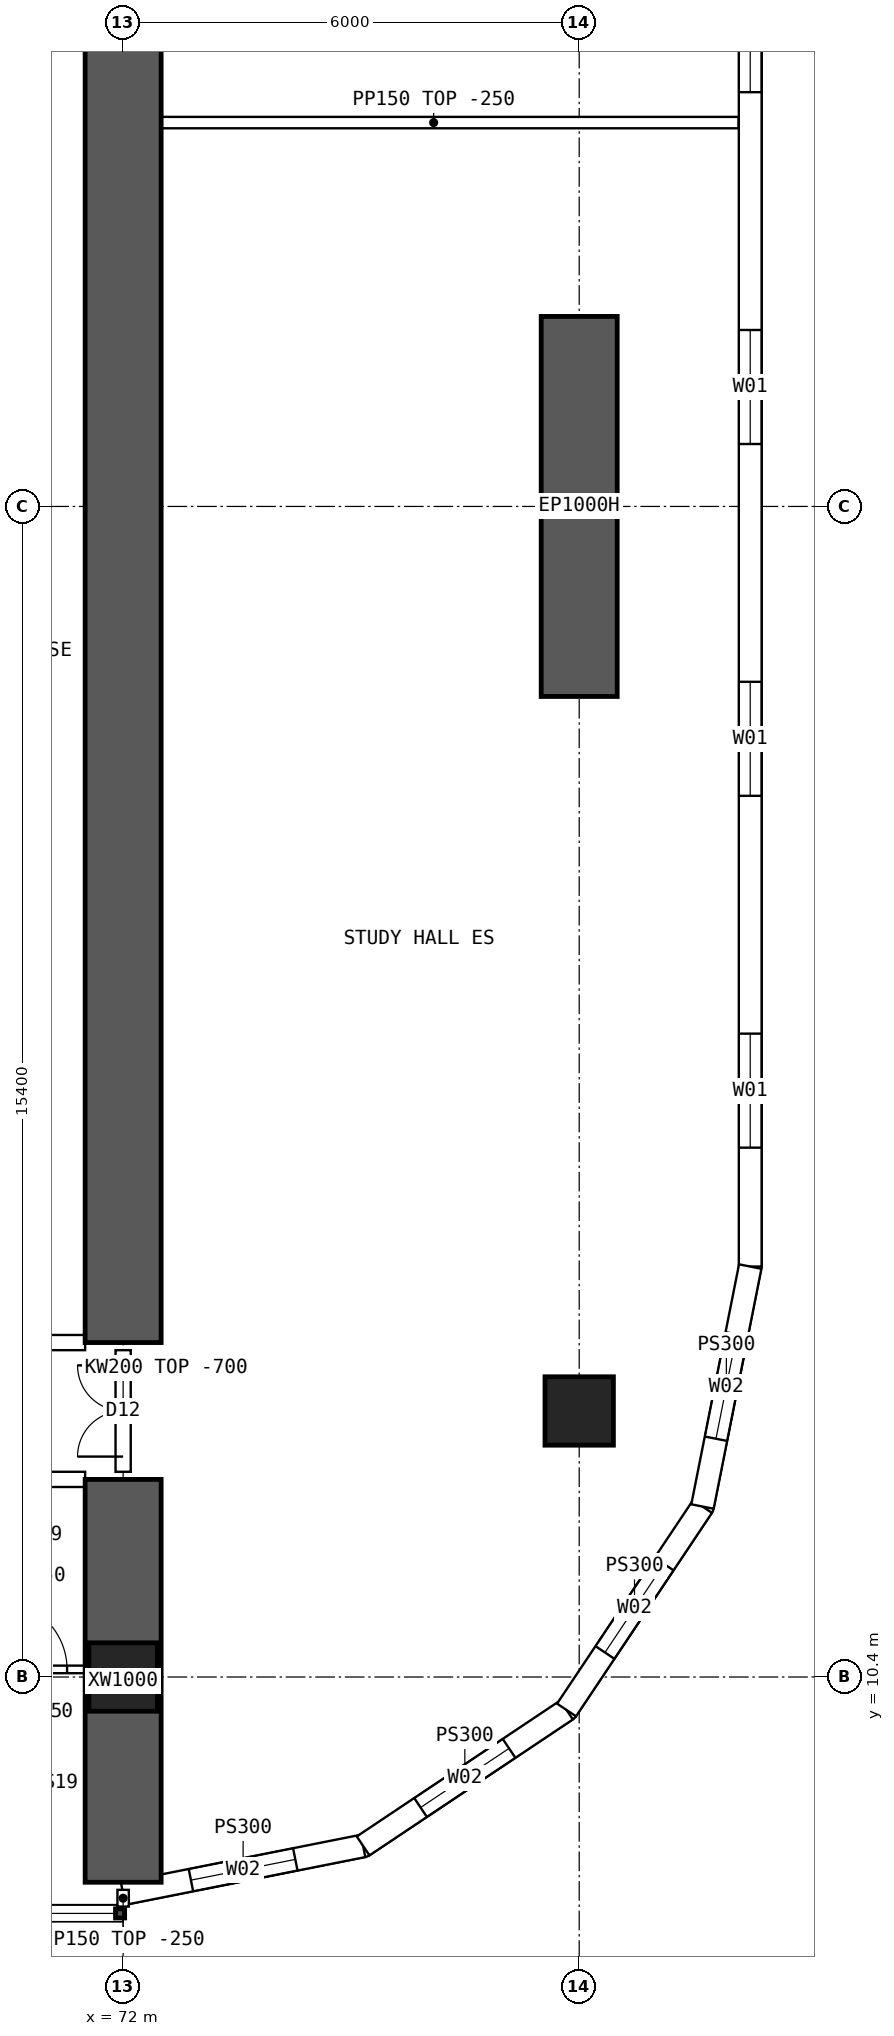
"""IFC4 building model, lengths in metres.
Left out: names, types, materials, properties, quantities, classifications, styles, units other than length and angle.
Written with IfcOpenShell. Run it as: python <this file> out.ifc"""

import sys

from ifc_helpers import new_model, si_unit, direction, frame, frame_2d, origin, origin_2d, place, context, subcontext, project, spatial, polyline, rectangle, hollow_rectangle, outline, extrude, element, fill, save


model = new_model("IFC4")
c1 = context("Model", 3, precision=1e-05, world=origin(), true_north=direction((0.0, 1.0)))
c2 = subcontext(c1, "Body", "Model", "MODEL_VIEW")
j1 = project(units=[si_unit("LENGTHUNIT", "METRE"), si_unit("PLANEANGLEUNIT", "RADIAN")], contexts=[c1])
p1 = place(None, origin())
s1 = spatial("IfcSite", under=j1, at=p1, CompositionType="ELEMENT")
p2 = place(p1, origin())
s2 = spatial("IfcBuilding", under=s1, at=p2, CompositionType="ELEMENT")
p3 = place(p2, frame((0.0, 0.0, 23.95)))
s3 = spatial("IfcBuildingStorey", under=s2, at=p3, CompositionType="ELEMENT", Elevation=23.95)
for number, where, z_axis, x_axis in (
    (1, (72.0, 10.4, 0.0), (0.0, 0.0, 1.0), (1.0, 0.0, 0.0)),
    (2, (78.0, 13.9, 0.0), (0.0, 0.0, 1.0), (1.0, 0.0, 0.0)),
):
    element("IfcColumn", number, at=place(p3, frame(where, z_axis=z_axis, x_axis=x_axis)), inside=s3, PredefinedType="COLUMN", context=c2, shape_type="SweptSolid", body=[
        extrude(hollow_rectangle(XDim=0.9, YDim=0.9, WallThickness=0.09, at=origin_2d()), origin(), (0.0, 0.0, 1.0), 3.75),
    ])
p4 = place(p3, frame((78.0, 23.3, 0.0), z_axis=(0.0, 0.0, 1.0), x_axis=(0.0, 1.0, 0.0)))
e3 = element("IfcWall", 3, at=p4, inside=s3, PredefinedType="SHEAR", context=c2, shape_type="SweptSolid", body=[
    extrude(rectangle(XDim=5.0, YDim=1.0, at=frame_2d((2.5, 0.0))), origin(), (0.0, 0.0, 1.0), 3.75),
])
p5 = place(p3, frame((72.0, 7.7, 0.0), z_axis=(0.0, 0.0, 1.0), x_axis=(0.0, 1.0, 0.0)))
e4 = element("IfcWall", 4, at=p5, inside=s3, PredefinedType="SHEAR", context=c2, shape_type="SweptSolid", body=[
    extrude(rectangle(XDim=5.3, YDim=1.0, at=frame_2d((2.65, 0.0))), origin(), (0.0, 0.0, 1.0), 3.75),
])
p6 = place(p3, frame((72.0, 14.8, 0.0), z_axis=(0.0, 0.0, 1.0), x_axis=(0.0, 1.0, 0.0)))
e5 = element("IfcWall", 5, at=p6, inside=s3, PredefinedType="SHEAR", context=c2, shape_type="SweptSolid", body=[
    extrude(rectangle(XDim=34.4, YDim=1.0, at=frame_2d((17.2, 0.0))), origin(), (0.0, 0.0, 1.0), 3.75),
])
p7 = place(p3, frame((80.25, 15.8, 0.0), z_axis=(0.0, 0.0, 1.0), x_axis=(0.0, 1.0, 0.0)))
e6 = element("IfcWall", 6, at=p7, inside=s3, PredefinedType="SOLIDWALL", context=c2, shape_type="SweptSolid", body=[
    extrude(outline(polyline([(-0.015, -0.15), (32.415, -0.15), (32.385, 0.15), (0.015, 0.15), (-0.015, -0.15)])), origin(), (0.0, 0.0, 1.0), 3.5),
])
p8 = place(p7, frame((1.564, 0.0, 0.9)))
e7 = element("IfcOpeningElement", 7, at=p8, cuts=e6, PredefinedType="OPENING", context=c2, shape_type="SweptSolid", body=[
    extrude(rectangle(XDim=1.5, YDim=2.0, at=frame_2d((0.75, 1.0))), frame((0.0, 0.16, 0.0), z_axis=(0.0, -1.0, 0.0), x_axis=(1.0, 0.0, 0.0)), (0.0, 0.0, 1.0), 0.32),
])
p9 = place(p7, frame((6.193, 0.0, 0.9)))
e8 = element("IfcOpeningElement", 8, at=p9, cuts=e6, PredefinedType="OPENING", context=c2, shape_type="SweptSolid", body=[
    extrude(rectangle(XDim=1.5, YDim=2.0, at=frame_2d((0.75, 1.0))), frame((0.0, 0.16, 0.0), z_axis=(0.0, -1.0, 0.0), x_axis=(1.0, 0.0, 0.0)), (0.0, 0.0, 1.0), 0.32),
])
p10 = place(p7, frame((10.822, 0.0, 0.9)))
e9 = element("IfcOpeningElement", 9, at=p10, cuts=e6, PredefinedType="OPENING", context=c2, shape_type="SweptSolid", body=[
    extrude(rectangle(XDim=1.5, YDim=2.0, at=frame_2d((0.75, 1.0))), frame((0.0, 0.16, 0.0), z_axis=(0.0, -1.0, 0.0), x_axis=(1.0, 0.0, 0.0)), (0.0, 0.0, 1.0), 0.32),
])
p11 = place(p7, frame((15.45, 0.0, 0.9)))
e10 = element("IfcOpeningElement", 10, at=p11, cuts=e6, PredefinedType="OPENING", context=c2, shape_type="SweptSolid", body=[
    extrude(rectangle(XDim=1.5, YDim=2.0, at=frame_2d((0.75, 1.0))), frame((0.0, 0.16, 0.0), z_axis=(0.0, -1.0, 0.0), x_axis=(1.0, 0.0, 0.0)), (0.0, 0.0, 1.0), 0.32),
])
p12 = place(p7, frame((20.079, 0.0, 0.9)))
e11 = element("IfcOpeningElement", 11, at=p12, cuts=e6, PredefinedType="OPENING", context=c2, shape_type="SweptSolid", body=[
    extrude(rectangle(XDim=1.5, YDim=2.0, at=frame_2d((0.75, 1.0))), frame((0.0, 0.16, 0.0), z_axis=(0.0, -1.0, 0.0), x_axis=(1.0, 0.0, 0.0)), (0.0, 0.0, 1.0), 0.32),
])
p13 = place(p7, frame((24.707, 0.0, 0.9)))
e12 = element("IfcOpeningElement", 12, at=p13, cuts=e6, PredefinedType="OPENING", context=c2, shape_type="SweptSolid", body=[
    extrude(rectangle(XDim=1.5, YDim=2.0, at=frame_2d((0.75, 1.0))), frame((0.0, 0.16, 0.0), z_axis=(0.0, -1.0, 0.0), x_axis=(1.0, 0.0, 0.0)), (0.0, 0.0, 1.0), 0.32),
])
p14 = place(p7, frame((29.336, 0.0, 0.9)))
e13 = element("IfcOpeningElement", 13, at=p14, cuts=e6, PredefinedType="OPENING", context=c2, shape_type="SweptSolid", body=[
    extrude(rectangle(XDim=1.5, YDim=2.0, at=frame_2d((0.75, 1.0))), frame((0.0, 0.16, 0.0), z_axis=(0.0, -1.0, 0.0), x_axis=(1.0, 0.0, 0.0)), (0.0, 0.0, 1.0), 0.32),
])
p15 = place(p3, frame((72.0, 7.55, 0.0), z_axis=(0.0, 0.0, 1.0), x_axis=(0.980787251524, 0.195080412259, 0.0)))
e14 = element("IfcWall", 14, at=p15, inside=s3, PredefinedType="SOLIDWALL", context=c2, shape_type="SweptSolid", body=[
    extrude(outline(polyline([(-0.03, -0.15), (3.249, -0.15), (3.189, 0.15), (0.03, 0.15), (-0.03, -0.15)])), origin(), (0.0, 0.0, 1.0), 3.5),
])
p16 = place(p15, frame((0.909, 0.0, 0.9)))
e15 = element("IfcOpeningElement", 15, at=p16, cuts=e14, PredefinedType="OPENING", context=c2, shape_type="SweptSolid", body=[
    extrude(rectangle(XDim=1.4, YDim=1.8, at=frame_2d((0.7, 0.9))), frame((0.0, 0.16, 0.0), z_axis=(0.0, -1.0, 0.0), x_axis=(1.0, 0.0, 0.0)), (0.0, 0.0, 1.0), 0.32),
])
p17 = place(p3, frame((75.157, 8.178, 0.0), z_axis=(0.0, 0.0, 1.0), x_axis=(0.831478105043, 0.555557522525, 0.0)))
e16 = element("IfcWall", 16, at=p17, inside=s3, PredefinedType="SOLIDWALL", context=c2, shape_type="SweptSolid", body=[
    extrude(outline(polyline([(-0.03, -0.15), (3.249, -0.15), (3.189, 0.15), (0.03, 0.15), (-0.03, -0.15)])), origin(), (0.0, 0.0, 1.0), 3.5),
])
p18 = place(p17, frame((0.909, 0.0, 0.9)))
e17 = element("IfcOpeningElement", 17, at=p18, cuts=e16, PredefinedType="OPENING", context=c2, shape_type="SweptSolid", body=[
    extrude(rectangle(XDim=1.4, YDim=1.8, at=frame_2d((0.7, 0.9))), frame((0.0, 0.16, 0.0), z_axis=(0.0, -1.0, 0.0), x_axis=(1.0, 0.0, 0.0)), (0.0, 0.0, 1.0), 0.32),
])
p19 = place(p3, frame((77.833, 9.966, 0.0), z_axis=(0.0, 0.0, 1.0), x_axis=(0.555609954424, 0.831443069936, 0.0)))
e18 = element("IfcWall", 18, at=p19, inside=s3, PredefinedType="SOLIDWALL", context=c2, shape_type="SweptSolid", body=[
    extrude(outline(polyline([(-0.03, -0.15), (3.249, -0.15), (3.189, 0.15), (0.03, 0.15), (-0.03, -0.15)])), origin(), (0.0, 0.0, 1.0), 3.5),
])
p20 = place(p19, frame((0.909, 0.0, 0.9)))
e19 = element("IfcOpeningElement", 19, at=p20, cuts=e18, PredefinedType="OPENING", context=c2, shape_type="SweptSolid", body=[
    extrude(rectangle(XDim=1.4, YDim=1.8, at=frame_2d((0.7, 0.9))), frame((0.0, 0.16, 0.0), z_axis=(0.0, -1.0, 0.0), x_axis=(1.0, 0.0, 0.0)), (0.0, 0.0, 1.0), 0.32),
])
p21 = place(p3, frame((79.622, 12.643, 0.0), z_axis=(0.0, 0.0, 1.0), x_axis=(0.195065901187, 0.980790137692, 0.0)))
e20 = element("IfcWall", 20, at=p21, inside=s3, PredefinedType="SOLIDWALL", context=c2, shape_type="SweptSolid", body=[
    extrude(outline(polyline([(-0.03, -0.15), (3.234, -0.15), (3.204, 0.15), (0.03, 0.15), (-0.03, -0.15)])), origin(), (0.0, 0.0, 1.0), 3.5),
])
p22 = place(p21, frame((0.909, 0.0, 0.9)))
e21 = element("IfcOpeningElement", 21, at=p22, cuts=e20, PredefinedType="OPENING", context=c2, shape_type="SweptSolid", body=[
    extrude(rectangle(XDim=1.4, YDim=1.8, at=frame_2d((0.7, 0.9))), frame((0.0, 0.16, 0.0), z_axis=(0.0, -1.0, 0.0), x_axis=(1.0, 0.0, 0.0)), (0.0, 0.0, 1.0), 0.32),
])
p23 = place(p3, frame((66.5, 13.0, 0.0), z_axis=(0.0, 0.0, 1.0), x_axis=(1.0, 0.0, 0.0)))
e22 = element("IfcWall", 22, at=p23, inside=s3, PredefinedType="SOLIDWALL", context=c2, shape_type="SweptSolid", body=[
    extrude(outline(polyline([(0.0, 0.0), (5.0, 0.0), (5.0, 3.1), (0.0, 3.1), (0.0, 0.0)])), frame((0.0, 0.1, 0.0), z_axis=(0.0, -1.0, 0.0), x_axis=(1.0, 0.0, 0.0)), (0.0, 0.0, 1.0), 0.2),
])
p24 = place(p23, frame((1.425, 0.0, 0.0)))
e23 = element("IfcOpeningElement", 23, at=p24, cuts=e22, PredefinedType="OPENING", context=c2, shape_type="SweptSolid", body=[
    extrude(rectangle(XDim=0.9, YDim=2.1, at=frame_2d((0.45, 1.05))), frame((0.0, 0.11, 0.0), z_axis=(0.0, -1.0, 0.0), x_axis=(1.0, 0.0, 0.0)), (0.0, 0.0, 1.0), 0.22),
])
p25 = place(p23, frame((2.675, 0.0, 0.0)))
e24 = element("IfcOpeningElement", 24, at=p25, cuts=e22, PredefinedType="OPENING", context=c2, shape_type="SweptSolid", body=[
    extrude(rectangle(XDim=0.9, YDim=2.1, at=frame_2d((0.45, 1.05))), frame((0.0, 0.11, 0.0), z_axis=(0.0, -1.0, 0.0), x_axis=(1.0, 0.0, 0.0)), (0.0, 0.0, 1.0), 0.22),
])
p26 = place(p3, frame((66.5, 14.8, 0.0), z_axis=(0.0, 0.0, 1.0), x_axis=(1.0, 0.0, 0.0)))
e25 = element("IfcWall", 25, at=p26, inside=s3, PredefinedType="SOLIDWALL", context=c2, shape_type="SweptSolid", body=[
    extrude(rectangle(XDim=5.0, YDim=0.2, at=frame_2d((2.5, 0.0))), origin(), (0.0, 0.0, 1.0), 3.5),
])
p27 = place(p26, frame((0.2, 0.0, 0.0)))
e26 = element("IfcOpeningElement", 26, at=p27, cuts=e25, PredefinedType="OPENING", context=c2, shape_type="SweptSolid", body=[
    extrude(rectangle(XDim=1.6, YDim=2.1, at=frame_2d((0.8, 1.05))), frame((0.0, 0.11, 0.0), z_axis=(0.0, -1.0, 0.0), x_axis=(1.0, 0.0, 0.0)), (0.0, 0.0, 1.0), 0.22),
])
p28 = place(p3, frame((71.55, 10.5, 0.0), z_axis=(0.0, 0.0, 1.0), x_axis=(-1.0, 0.0, 0.0)))
e27 = element("IfcWall", 27, at=p28, inside=s3, PredefinedType="PARTITIONING", context=c2, shape_type="SweptSolid", body=[
    extrude(outline(polyline([(0.0, 0.0), (1.425, 0.0), (1.425, 3.1), (0.0, 3.1), (0.0, 0.0)])), frame((0.0, 0.05, 0.0), z_axis=(0.0, -1.0, 0.0), x_axis=(1.0, 0.0, 0.0)), (0.0, 0.0, 1.0), 0.1),
])
p29 = place(p28, frame((0.288, 0.0, 0.0)))
e28 = element("IfcOpeningElement", 28, at=p29, cuts=e27, PredefinedType="OPENING", context=c2, shape_type="SweptSolid", body=[
    extrude(rectangle(XDim=0.9, YDim=2.1, at=frame_2d((0.45, 1.05))), frame((0.0, 0.06, 0.0), z_axis=(0.0, -1.0, 0.0), x_axis=(1.0, 0.0, 0.0)), (0.0, 0.0, 1.0), 0.12),
])
p30 = place(p3, frame((72.075, 30.85, 0.0), z_axis=(0.0, 0.0, 1.0), x_axis=(1.0, 0.0, 0.0)))
e29 = element("IfcWall", 29, at=p30, inside=s3, PredefinedType="PARTITIONING", context=c2, shape_type="SweptSolid", body=[
    extrude(outline(polyline([(0.0, 0.0), (8.02, 0.0), (8.02, 3.5), (6.227, 3.5), (6.225, 3.05), (5.627, 3.05), (5.625, 3.5), (0.0, 3.5), (0.0, 0.0)])), frame((0.0, 0.075, 0.0), z_axis=(0.0, -1.0, 0.0), x_axis=(1.0, 0.0, 0.0)), (0.0, 0.0, 1.0), 0.15),
])
p31 = place(p3, frame((72.0, 13.1, 0.0), z_axis=(0.0, 0.0, 1.0), x_axis=(0.0, 1.0, 0.0)))
e30 = element("IfcWall", 30, at=p31, inside=s3, PredefinedType="SOLIDWALL", context=c2, shape_type="SweptSolid", body=[
    extrude(outline(polyline([(0.0, 0.0), (1.6, 0.0), (1.6, 3.05), (0.0, 3.05), (0.0, 0.0)])), frame((0.0, 0.1, 0.0), z_axis=(0.0, -1.0, 0.0), x_axis=(1.0, 0.0, 0.0)), (0.0, 0.0, 1.0), 0.2),
])
p32 = place(p31, frame((0.2, 0.0, 0.0)))
e31 = element("IfcOpeningElement", 31, at=p32, cuts=e30, PredefinedType="OPENING", context=c2, shape_type="SweptSolid", body=[
    extrude(rectangle(XDim=1.2, YDim=2.1, at=frame_2d((0.6, 1.05))), frame((0.0, 0.11, 0.0), z_axis=(0.0, -1.0, 0.0), x_axis=(1.0, 0.0, 0.0)), (0.0, 0.0, 1.0), 0.22),
])
p33 = place(p3, frame((72.0, 7.6, 0.0), z_axis=(0.0, 0.0, 1.0), x_axis=(0.0, -1.0, 0.0)))
e32 = element("IfcWall", 32, at=p33, inside=s3, PredefinedType="PARTITIONING", context=c2, shape_type="SweptSolid", body=[
    extrude(rectangle(XDim=0.22, YDim=0.15, at=frame_2d((0.11, 0.0))), origin(), (0.0, 0.0, 1.0), 3.5),
])
p34 = place(p8, origin())
e33 = element("IfcWindow", 33, at=p34, inside=s3, PartitioningType="SINGLE_PANEL", PredefinedType="WINDOW", context=c2, shape_type="SweptSolid", body=[
    extrude(rectangle(XDim=1.5, YDim=2.0, at=frame_2d((0.75, 1.0))), frame((0.0, 0.03, 0.0), z_axis=(0.0, -1.0, 0.0), x_axis=(1.0, 0.0, 0.0)), (0.0, 0.0, 1.0), 0.06),
])
fill(e7, e33)
p35 = place(p9, origin())
e34 = element("IfcWindow", 34, at=p35, inside=s3, PartitioningType="SINGLE_PANEL", PredefinedType="WINDOW", context=c2, shape_type="SweptSolid", body=[
    extrude(rectangle(XDim=1.5, YDim=2.0, at=frame_2d((0.75, 1.0))), frame((0.0, 0.03, 0.0), z_axis=(0.0, -1.0, 0.0), x_axis=(1.0, 0.0, 0.0)), (0.0, 0.0, 1.0), 0.06),
])
fill(e8, e34)
p36 = place(p10, origin())
e35 = element("IfcWindow", 35, at=p36, inside=s3, PartitioningType="SINGLE_PANEL", PredefinedType="WINDOW", context=c2, shape_type="SweptSolid", body=[
    extrude(rectangle(XDim=1.5, YDim=2.0, at=frame_2d((0.75, 1.0))), frame((0.0, 0.03, 0.0), z_axis=(0.0, -1.0, 0.0), x_axis=(1.0, 0.0, 0.0)), (0.0, 0.0, 1.0), 0.06),
])
fill(e9, e35)
p37 = place(p11, origin())
e36 = element("IfcWindow", 36, at=p37, inside=s3, PartitioningType="SINGLE_PANEL", PredefinedType="WINDOW", context=c2, shape_type="SweptSolid", body=[
    extrude(rectangle(XDim=1.5, YDim=2.0, at=frame_2d((0.75, 1.0))), frame((0.0, 0.03, 0.0), z_axis=(0.0, -1.0, 0.0), x_axis=(1.0, 0.0, 0.0)), (0.0, 0.0, 1.0), 0.06),
])
fill(e10, e36)
p38 = place(p16, origin())
e37 = element("IfcWindow", 37, at=p38, inside=s3, PartitioningType="SINGLE_PANEL", PredefinedType="WINDOW", context=c2, shape_type="SweptSolid", body=[
    extrude(rectangle(XDim=1.4, YDim=1.8, at=frame_2d((0.7, 0.9))), frame((0.0, 0.03, 0.0), z_axis=(0.0, -1.0, 0.0), x_axis=(1.0, 0.0, 0.0)), (0.0, 0.0, 1.0), 0.06),
])
fill(e15, e37)
p39 = place(p18, origin())
e38 = element("IfcWindow", 38, at=p39, inside=s3, PartitioningType="SINGLE_PANEL", PredefinedType="WINDOW", context=c2, shape_type="SweptSolid", body=[
    extrude(rectangle(XDim=1.4, YDim=1.8, at=frame_2d((0.7, 0.9))), frame((0.0, 0.03, 0.0), z_axis=(0.0, -1.0, 0.0), x_axis=(1.0, 0.0, 0.0)), (0.0, 0.0, 1.0), 0.06),
])
fill(e17, e38)
p40 = place(p20, origin())
e39 = element("IfcWindow", 39, at=p40, inside=s3, PartitioningType="SINGLE_PANEL", PredefinedType="WINDOW", context=c2, shape_type="SweptSolid", body=[
    extrude(rectangle(XDim=1.4, YDim=1.8, at=frame_2d((0.7, 0.9))), frame((0.0, 0.03, 0.0), z_axis=(0.0, -1.0, 0.0), x_axis=(1.0, 0.0, 0.0)), (0.0, 0.0, 1.0), 0.06),
])
fill(e19, e39)
p41 = place(p22, origin())
e40 = element("IfcWindow", 40, at=p41, inside=s3, PartitioningType="SINGLE_PANEL", PredefinedType="WINDOW", context=c2, shape_type="SweptSolid", body=[
    extrude(rectangle(XDim=1.4, YDim=1.8, at=frame_2d((0.7, 0.9))), frame((0.0, 0.03, 0.0), z_axis=(0.0, -1.0, 0.0), x_axis=(1.0, 0.0, 0.0)), (0.0, 0.0, 1.0), 0.06),
])
fill(e21, e40)
p42 = place(p29, origin())
e41 = element("IfcDoor", 41, at=p42, inside=s3, OperationType="SINGLE_SWING_RIGHT", PredefinedType="DOOR", context=c2, shape_type="SweptSolid", body=[
    extrude(rectangle(XDim=0.9, YDim=2.1, at=frame_2d((0.45, 1.05))), frame((0.0, 0.025, 0.0), z_axis=(0.0, -1.0, 0.0), x_axis=(1.0, 0.0, 0.0)), (0.0, 0.0, 1.0), 0.05),
])
fill(e28, e41)
p43 = place(p32, origin())
e42 = element("IfcDoor", 42, at=p43, inside=s3, OperationType="DOUBLE_DOOR_SINGLE_SWING", PredefinedType="DOOR", context=c2, shape_type="SweptSolid", body=[
    extrude(rectangle(XDim=1.2, YDim=2.1, at=frame_2d((0.6, 1.05))), frame((0.0, 0.025, 0.0), z_axis=(0.0, -1.0, 0.0), x_axis=(1.0, 0.0, 0.0)), (0.0, 0.0, 1.0), 0.05),
])
fill(e31, e42)
save(model, sys.argv[1])
